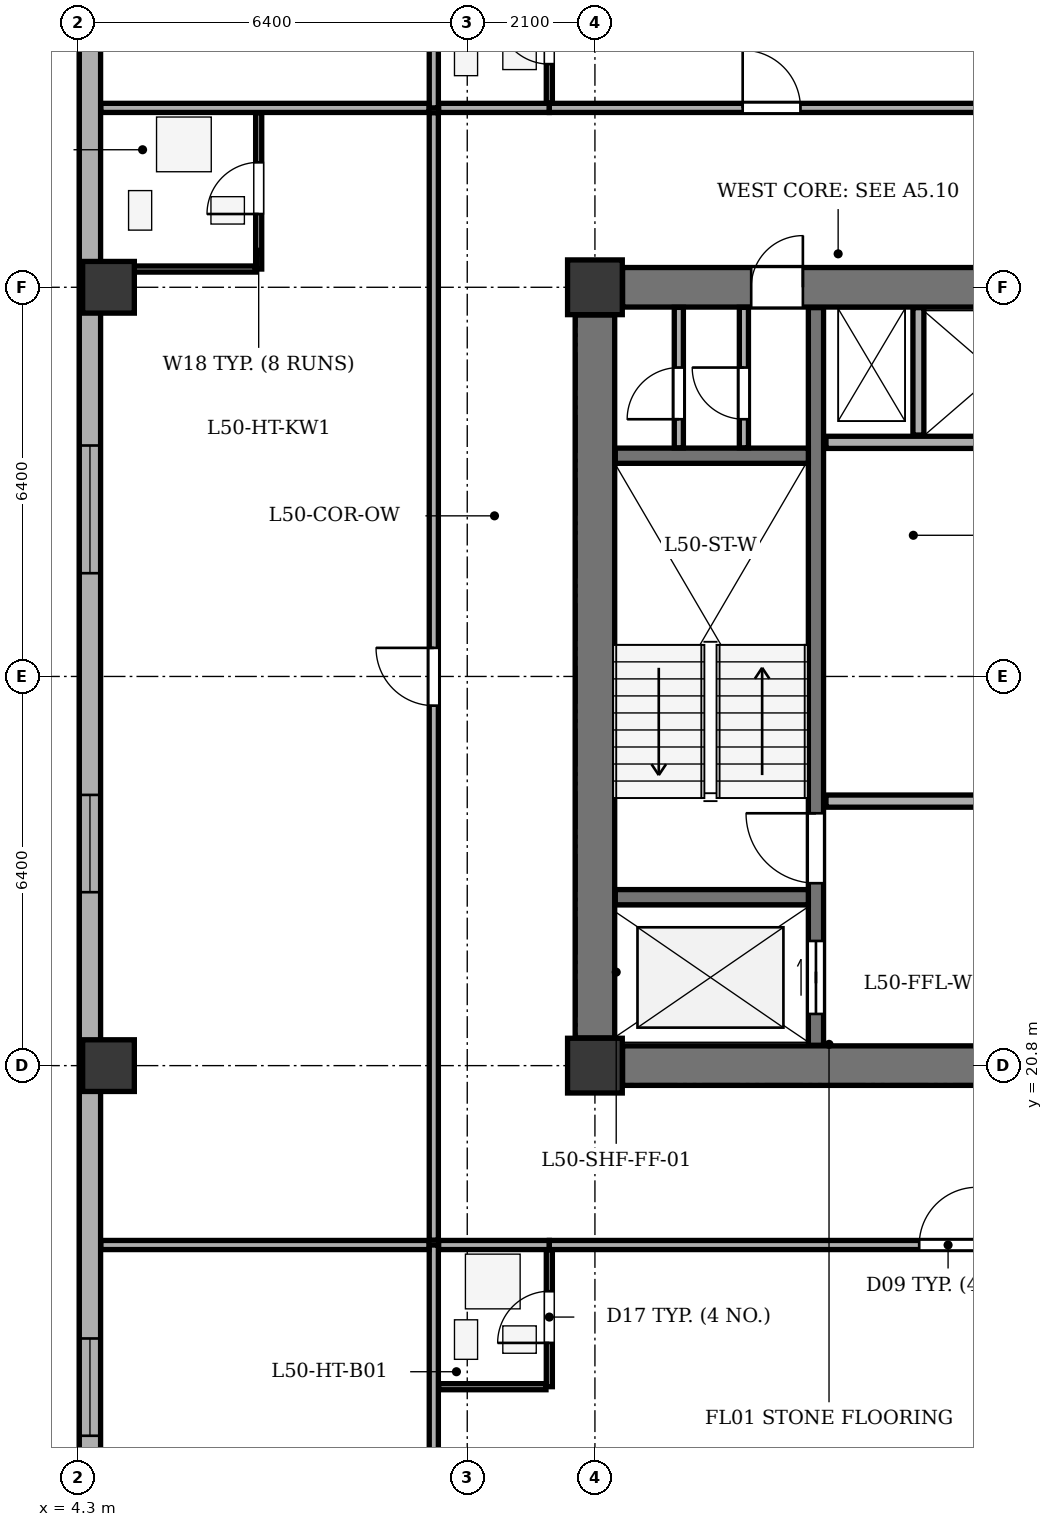
"""IFC4 building model, lengths in metres.
Left out: names, types, materials, properties, quantities, classifications, styles, units other than length and angle.
Written with IfcOpenShell. Run it as: python <this file> out.ifc"""

import sys

from ifc_helpers import new_model, si_unit, direction, frame, frame_2d, origin, origin_2d, place, context, subcontext, project, spatial, rectangle, extrude, element, fill, save


model = new_model("IFC4")
c1 = context("Model", 3, precision=1e-05, world=origin(), true_north=direction((0.0, 1.0)))
c2 = subcontext(c1, "Body", "Model", "MODEL_VIEW")
j1 = project(units=[si_unit("LENGTHUNIT", "METRE"), si_unit("PLANEANGLEUNIT", "RADIAN")], contexts=[c1])
p1 = place(None, origin())
s1 = spatial("IfcSite", under=j1, at=p1, CompositionType="ELEMENT")
p2 = place(p1, origin())
s2 = spatial("IfcBuilding", under=s1, at=p2, CompositionType="ELEMENT")
p3 = place(p2, frame((0.0, 0.0, 193.8)))
s3 = spatial("IfcBuildingStorey", under=s2, at=p3, CompositionType="ELEMENT", Elevation=193.8)
for number, where, z_axis, x_axis in (
    (1, (12.8, 20.8, 0.0), (0.0, 0.0, 1.0), (1.0, 0.0, 0.0)),
    (2, (12.8, 33.6, 0.0), (0.0, 0.0, 1.0), (1.0, 0.0, 0.0)),
):
    element("IfcColumn", number, at=place(p3, frame(where, z_axis=z_axis, x_axis=x_axis)), inside=s3, PredefinedType="COLUMN", context=c2, shape_type="SweptSolid", body=[
        extrude(rectangle(XDim=0.9, YDim=0.9, at=origin_2d()), origin(), (0.0, 0.0, 1.0), 3.5),
    ])
for number, where, z_axis, x_axis in (
    (3, (4.8, 20.8, 0.0), (0.0, 0.0, 1.0), (1.0, 0.0, 0.0)),
    (4, (4.8, 33.6, 0.0), (0.0, 0.0, 1.0), (1.0, 0.0, 0.0)),
):
    element("IfcColumn", number, at=place(p3, frame(where, z_axis=z_axis, x_axis=x_axis)), inside=s3, PredefinedType="COLUMN", context=c2, shape_type="SweptSolid", body=[
        extrude(rectangle(XDim=0.85, YDim=0.85, at=origin_2d()), origin(), (0.0, 0.0, 1.0), 3.5),
    ])
p4 = place(p3, frame((4.495, 12.9, 0.0), z_axis=(0.0, 0.0, 1.0), x_axis=(0.0, 1.0, 0.0)))
e5 = element("IfcWall", 5, at=p4, inside=s3, PredefinedType="STANDARD", context=c2, shape_type="SweptSolid", body=[
    extrude(rectangle(XDim=35.0, YDim=0.35, at=frame_2d((17.5, 0.0))), origin(), (0.0, 0.0, 1.0), 2.635),
])
p5 = place(p4, frame((1.813, 0.0, 0.75)))
e6 = element("IfcOpeningElement", 6, at=p5, cuts=e5, PredefinedType="OPENING", context=c2, shape_type="SweptSolid", body=[
    extrude(rectangle(XDim=1.6, YDim=1.75, at=frame_2d((0.8, 0.875))), frame((0.0, 0.185, 0.0), z_axis=(0.0, -1.0, 0.0), x_axis=(1.0, 0.0, 0.0)), (0.0, 0.0, 1.0), 0.37),
])
p6 = place(p4, frame((10.752, 0.0, 0.75)))
e7 = element("IfcOpeningElement", 7, at=p6, cuts=e5, PredefinedType="OPENING", context=c2, shape_type="SweptSolid", body=[
    extrude(rectangle(XDim=1.6, YDim=1.75, at=frame_2d((0.8, 0.875))), frame((0.0, 0.185, 0.0), z_axis=(0.0, -1.0, 0.0), x_axis=(1.0, 0.0, 0.0)), (0.0, 0.0, 1.0), 0.37),
])
p7 = place(p4, frame((15.998, 0.0, 0.75)))
e8 = element("IfcOpeningElement", 8, at=p7, cuts=e5, PredefinedType="OPENING", context=c2, shape_type="SweptSolid", body=[
    extrude(rectangle(XDim=2.1, YDim=1.75, at=frame_2d((1.05, 0.875))), frame((0.0, 0.185, 0.0), z_axis=(0.0, -1.0, 0.0), x_axis=(1.0, 0.0, 0.0)), (0.0, 0.0, 1.0), 0.37),
])
p8 = place(p4, frame((25.97, 0.0, 0.75)))
e9 = element("IfcOpeningElement", 9, at=p8, cuts=e5, PredefinedType="OPENING", context=c2, shape_type="SweptSolid", body=[
    extrude(rectangle(XDim=1.6, YDim=1.75, at=frame_2d((0.8, 0.875))), frame((0.0, 0.185, 0.0), z_axis=(0.0, -1.0, 0.0), x_axis=(1.0, 0.0, 0.0)), (0.0, 0.0, 1.0), 0.37),
])
p9 = place(p4, frame((30.555, 0.0, 0.75)))
e10 = element("IfcOpeningElement", 10, at=p9, cuts=e5, PredefinedType="OPENING", context=c2, shape_type="SweptSolid", body=[
    extrude(rectangle(XDim=2.1, YDim=1.75, at=frame_2d((1.05, 0.875))), frame((0.0, 0.185, 0.0), z_axis=(0.0, -1.0, 0.0), x_axis=(1.0, 0.0, 0.0)), (0.0, 0.0, 1.0), 0.37),
])
p10 = place(p3, frame((12.8, 21.255, 0.0), z_axis=(0.0, 0.0, 1.0), x_axis=(0.0, 1.0, 0.0)))
e11 = element("IfcWall", 11, at=p10, inside=s3, PredefinedType="SHEAR", context=c2, shape_type="SweptSolid", body=[
    extrude(rectangle(XDim=11.89, YDim=0.65, at=frame_2d((5.945, 0.0))), origin(), (0.0, 0.0, 1.0), 3.05),
])
p11 = place(p3, frame((13.255, 20.8, 0.0), z_axis=(0.0, 0.0, 1.0), x_axis=(1.0, 0.0, 0.0)))
e12 = element("IfcWall", 12, at=p11, inside=s3, PredefinedType="SHEAR", context=c2, shape_type="SweptSolid", body=[
    extrude(rectangle(XDim=7.09, YDim=0.65, at=frame_2d((3.545, 0.0))), origin(), (0.0, 0.0, 1.0), 3.05),
])
p12 = place(p3, frame((13.255, 33.6, 0.0), z_axis=(0.0, 0.0, 1.0), x_axis=(1.0, 0.0, 0.0)))
e13 = element("IfcWall", 13, at=p12, inside=s3, PredefinedType="SHEAR", context=c2, shape_type="SweptSolid", body=[
    extrude(rectangle(XDim=7.09, YDim=0.65, at=frame_2d((3.545, 0.0))), origin(), (0.0, 0.0, 1.0), 3.05),
])
p13 = place(p12, frame((2.115, 0.0, 0.0)))
e14 = element("IfcOpeningElement", 14, at=p13, cuts=e13, PredefinedType="OPENING", context=c2, shape_type="SweptSolid", body=[
    extrude(rectangle(XDim=0.85, YDim=2.02, at=frame_2d((0.425, 1.01))), frame((0.0, 0.335, 0.0), z_axis=(0.0, -1.0, 0.0), x_axis=(1.0, 0.0, 0.0)), (0.0, 0.0, 1.0), 0.67),
])
p14 = place(p3, frame((16.435, 21.135, 0.0), z_axis=(0.0, 0.0, 1.0), x_axis=(0.0, 1.0, 0.0)))
e15 = element("IfcWall", 15, at=p14, inside=s3, PredefinedType="SHEAR", context=c2, shape_type="SweptSolid", body=[
    extrude(rectangle(XDim=12.13, YDim=0.25, at=frame_2d((6.065, 0.0))), origin(), (0.0, 0.0, 1.0), 3.05),
])
p15 = place(p14, frame((0.515, 0.0, 0.0)))
e16 = element("IfcOpeningElement", 16, at=p15, cuts=e15, PredefinedType="OPENING", context=c2, shape_type="SweptSolid", body=[
    extrude(rectangle(XDim=1.2, YDim=2.15, at=frame_2d((0.6, 1.075))), frame((0.0, 0.135, 0.0), z_axis=(0.0, -1.0, 0.0), x_axis=(1.0, 0.0, 0.0)), (0.0, 0.0, 1.0), 0.27),
])
p16 = place(p14, frame((2.665, 0.0, 0.0)))
e17 = element("IfcOpeningElement", 17, at=p16, cuts=e15, PredefinedType="OPENING", context=c2, shape_type="SweptSolid", body=[
    extrude(rectangle(XDim=1.15, YDim=2.15, at=frame_2d((0.575, 1.075))), frame((0.0, 0.135, 0.0), z_axis=(0.0, -1.0, 0.0), x_axis=(1.0, 0.0, 0.0)), (0.0, 0.0, 1.0), 0.27),
])
for number, where, z_axis, x_axis in (
    (18, (13.135, 23.57, 0.0), (0.0, 0.0, 1.0), (1.0, 0.0, 0.0)),
    (19, (13.135, 30.83, 0.0), (0.0, 0.0, 1.0), (1.0, 0.0, 0.0)),
):
    element("IfcWall", number, at=place(p3, frame(where, z_axis=z_axis, x_axis=x_axis)), inside=s3, PredefinedType="SHEAR", context=c2, shape_type="SweptSolid", body=[
        extrude(rectangle(XDim=3.175, YDim=0.25, at=frame_2d((1.587, 0.0))), origin(), (0.0, 0.0, 1.0), 3.05),
    ])
for number, where, z_axis, x_axis in (
    (20, (16.6, 25.15, 0.0), (0.0, 0.0, 1.0), (1.0, 0.0, 0.0)),
    (21, (16.6, 31.05, 0.0), (0.0, 0.0, 1.0), (1.0, 0.0, 0.0)),
):
    element("IfcWall", number, at=place(p3, frame(where, z_axis=z_axis, x_axis=x_axis)), inside=s3, PredefinedType="SOLIDWALL", context=c2, shape_type="SweptSolid", body=[
        extrude(rectangle(XDim=3.85, YDim=0.2, at=frame_2d((1.925, 0.0))), origin(), (0.0, 0.0, 1.0), 3.05),
    ])
p17 = place(p3, frame((18.12, 31.17, 0.0), z_axis=(0.0, 0.0, 1.0), x_axis=(0.0, 1.0, 0.0)))
e22 = element("IfcWall", 22, at=p17, inside=s3, PredefinedType="PARTITIONING", context=c2, shape_type="SweptSolid", body=[
    extrude(rectangle(XDim=2.095, YDim=0.18, at=frame_2d((1.047, 0.0))), origin(), (0.0, 0.0, 1.0), 3.05),
])
p18 = place(p3, frame((14.18, 30.96, 0.0), z_axis=(0.0, 0.0, 1.0), x_axis=(0.0, 1.0, 0.0)))
e23 = element("IfcWall", 23, at=p18, inside=s3, PredefinedType="PARTITIONING", context=c2, shape_type="SweptSolid", body=[
    extrude(rectangle(XDim=2.31, YDim=0.15, at=frame_2d((1.155, 0.0))), origin(), (0.0, 0.0, 1.0), 3.05),
])
p19 = place(p18, frame((0.47, 0.0, 0.0)))
e24 = element("IfcOpeningElement", 24, at=p19, cuts=e23, PredefinedType="OPENING", context=c2, shape_type="SweptSolid", body=[
    extrude(rectangle(XDim=0.85, YDim=2.02, at=frame_2d((0.425, 1.01))), frame((0.0, 0.085, 0.0), z_axis=(0.0, -1.0, 0.0), x_axis=(1.0, 0.0, 0.0)), (0.0, 0.0, 1.0), 0.17),
])
p20 = place(p3, frame((15.25, 30.96, 0.0), z_axis=(0.0, 0.0, 1.0), x_axis=(0.0, 1.0, 0.0)))
e25 = element("IfcWall", 25, at=p20, inside=s3, PredefinedType="PARTITIONING", context=c2, shape_type="SweptSolid", body=[
    extrude(rectangle(XDim=2.31, YDim=0.15, at=frame_2d((1.155, 0.0))), origin(), (0.0, 0.0, 1.0), 3.05),
])
p21 = place(p20, frame((0.47, 0.0, 0.0)))
e26 = element("IfcOpeningElement", 26, at=p21, cuts=e25, PredefinedType="OPENING", context=c2, shape_type="SweptSolid", body=[
    extrude(rectangle(XDim=0.85, YDim=2.02, at=frame_2d((0.425, 1.01))), frame((0.0, 0.085, 0.0), z_axis=(0.0, -1.0, 0.0), x_axis=(1.0, 0.0, 0.0)), (0.0, 0.0, 1.0), 0.17),
])
p22 = place(p3, frame((10.15, 8.275, 0.0), z_axis=(0.0, 0.0, 1.0), x_axis=(0.0, 1.0, 0.0)))
e27 = element("IfcWall", 27, at=p22, inside=s3, PredefinedType="PARTITIONING", context=c2, shape_type="SweptSolid", body=[
    extrude(rectangle(XDim=9.575, YDim=0.15, at=frame_2d((4.788, 0.0))), origin(), (0.0, 0.0, 1.0), 3.05),
])
p23 = place(p3, frame((10.23, 17.85, 0.0), z_axis=(0.0, 0.0, 1.0), x_axis=(1.0, 0.0, 0.0)))
e28 = element("IfcWall", 28, at=p23, inside=s3, PredefinedType="PARTITIONING", context=c2, shape_type="SweptSolid", body=[
    extrude(rectangle(XDim=1.82, YDim=0.15, at=frame_2d((0.91, 0.0))), origin(), (0.0, 0.0, 1.0), 3.05),
])
p24 = place(p3, frame((12.05, 17.85, 0.0), z_axis=(0.0, 0.0, 1.0), x_axis=(1.0, 0.0, 0.0)))
e29 = element("IfcWall", 29, at=p24, inside=s3, PredefinedType="PARTITIONING", context=c2, shape_type="SweptSolid", body=[
    extrude(rectangle(XDim=13.126, YDim=0.15, at=frame_2d((6.563, 0.0))), origin(), (0.0, 0.0, 1.0), 3.05),
])
p25 = place(p24, frame((6.083, 0.0, 0.0)))
e30 = element("IfcOpeningElement", 30, at=p25, cuts=e29, PredefinedType="OPENING", context=c2, shape_type="SweptSolid", body=[
    extrude(rectangle(XDim=0.95, YDim=2.1, at=frame_2d((0.475, 1.05))), frame((0.0, 0.085, 0.0), z_axis=(0.0, -1.0, 0.0), x_axis=(1.0, 0.0, 0.0)), (0.0, 0.0, 1.0), 0.17),
])
p26 = place(p3, frame((12.05, 15.52, 0.0), z_axis=(0.0, 0.0, 1.0), x_axis=(0.0, 1.0, 0.0)))
e31 = element("IfcWall", 31, at=p26, inside=s3, PredefinedType="PARTITIONING", context=c2, shape_type="SweptSolid", body=[
    extrude(rectangle(XDim=2.25, YDim=0.1, at=frame_2d((1.125, 0.0))), origin(), (0.0, 0.0, 1.0), 3.05),
])
p27 = place(p26, frame((0.72, 0.0, 0.0)))
e32 = element("IfcOpeningElement", 32, at=p27, cuts=e31, PredefinedType="OPENING", context=c2, shape_type="SweptSolid", body=[
    extrude(rectangle(XDim=0.85, YDim=2.05, at=frame_2d((0.425, 1.025))), frame((0.0, 0.06, 0.0), z_axis=(0.0, -1.0, 0.0), x_axis=(1.0, 0.0, 0.0)), (0.0, 0.0, 1.0), 0.12),
])
p28 = place(p3, frame((10.23, 15.52, 0.0), z_axis=(0.0, 0.0, 1.0), x_axis=(1.0, 0.0, 0.0)))
e33 = element("IfcWall", 33, at=p28, inside=s3, PredefinedType="PARTITIONING", context=c2, shape_type="SweptSolid", body=[
    extrude(rectangle(XDim=1.765, YDim=0.1, at=frame_2d((0.883, 0.0))), origin(), (0.0, 0.0, 1.0), 3.05),
])
p29 = place(p3, frame((10.15, 36.55, 0.0), z_axis=(0.0, 0.0, 1.0), x_axis=(0.0, 1.0, 0.0)))
e34 = element("IfcWall", 34, at=p29, inside=s3, PredefinedType="PARTITIONING", context=c2, shape_type="SweptSolid", body=[
    extrude(rectangle(XDim=15.975, YDim=0.15, at=frame_2d((7.987, 0.0))), origin(), (0.0, 0.0, 1.0), 3.05),
])
p30 = place(p3, frame((10.23, 36.55, 0.0), z_axis=(0.0, 0.0, 1.0), x_axis=(1.0, 0.0, 0.0)))
e35 = element("IfcWall", 35, at=p30, inside=s3, PredefinedType="PARTITIONING", context=c2, shape_type="SweptSolid", body=[
    extrude(rectangle(XDim=1.82, YDim=0.15, at=frame_2d((0.91, 0.0))), origin(), (0.0, 0.0, 1.0), 3.05),
])
p31 = place(p3, frame((12.05, 36.55, 0.0), z_axis=(0.0, 0.0, 1.0), x_axis=(1.0, 0.0, 0.0)))
e36 = element("IfcWall", 36, at=p31, inside=s3, PredefinedType="PARTITIONING", context=c2, shape_type="SweptSolid", body=[
    extrude(rectangle(XDim=7.24, YDim=0.15, at=frame_2d((3.62, 0.0))), origin(), (0.0, 0.0, 1.0), 3.05),
])
p32 = place(p31, frame((3.18, 0.0, 0.0)))
e37 = element("IfcOpeningElement", 37, at=p32, cuts=e36, PredefinedType="OPENING", context=c2, shape_type="SweptSolid", body=[
    extrude(rectangle(XDim=0.95, YDim=2.1, at=frame_2d((0.475, 1.05))), frame((0.0, 0.085, 0.0), z_axis=(0.0, -1.0, 0.0), x_axis=(1.0, 0.0, 0.0)), (0.0, 0.0, 1.0), 0.17),
])
p33 = place(p3, frame((12.05, 36.63, 0.0), z_axis=(0.0, 0.0, 1.0), x_axis=(0.0, 1.0, 0.0)))
e38 = element("IfcWall", 38, at=p33, inside=s3, PredefinedType="PARTITIONING", context=c2, shape_type="SweptSolid", body=[
    extrude(rectangle(XDim=2.25, YDim=0.1, at=frame_2d((1.125, 0.0))), origin(), (0.0, 0.0, 1.0), 3.05),
])
p34 = place(p33, frame((0.64, 0.0, 0.0)))
e39 = element("IfcOpeningElement", 39, at=p34, cuts=e38, PredefinedType="OPENING", context=c2, shape_type="SweptSolid", body=[
    extrude(rectangle(XDim=0.85, YDim=2.05, at=frame_2d((0.425, 1.025))), frame((0.0, 0.06, 0.0), z_axis=(0.0, -1.0, 0.0), x_axis=(1.0, 0.0, 0.0)), (0.0, 0.0, 1.0), 0.12),
])
for number, where, z_axis, x_axis in (
    (40, (4.675, 17.85, 0.0), (0.0, 0.0, 1.0), (1.0, 0.0, 0.0)),
    (41, (4.675, 36.55, 0.0), (0.0, 0.0, 1.0), (1.0, 0.0, 0.0)),
):
    element("IfcWall", number, at=place(p3, frame(where, z_axis=z_axis, x_axis=x_axis)), inside=s3, PredefinedType="PARTITIONING", context=c2, shape_type="SweptSolid", body=[
        extrude(rectangle(XDim=5.395, YDim=0.15, at=frame_2d((2.698, 0.0))), origin(), (0.0, 0.0, 1.0), 3.05),
    ])
p35 = place(p3, frame((10.15, 17.93, 0.0), z_axis=(0.0, 0.0, 1.0), x_axis=(0.0, 1.0, 0.0)))
e42 = element("IfcWall", 42, at=p35, inside=s3, PredefinedType="PARTITIONING", context=c2, shape_type="SweptSolid", body=[
    extrude(rectangle(XDim=18.54, YDim=0.15, at=frame_2d((9.27, 0.0))), origin(), (0.0, 0.0, 1.0), 3.05),
])
p36 = place(p35, frame((8.79, 0.0, 0.0)))
e43 = element("IfcOpeningElement", 43, at=p36, cuts=e42, PredefinedType="OPENING", context=c2, shape_type="SweptSolid", body=[
    extrude(rectangle(XDim=0.95, YDim=2.1, at=frame_2d((0.475, 1.05))), frame((0.0, 0.085, 0.0), z_axis=(0.0, -1.0, 0.0), x_axis=(1.0, 0.0, 0.0)), (0.0, 0.0, 1.0), 0.17),
])
p37 = place(p3, frame((7.27, 33.9, 0.0), z_axis=(0.0, 0.0, 1.0), x_axis=(0.0, 1.0, 0.0)))
e44 = element("IfcWall", 44, at=p37, inside=s3, PredefinedType="PARTITIONING", context=c2, shape_type="SweptSolid", body=[
    extrude(rectangle(XDim=2.57, YDim=0.1, at=frame_2d((1.285, 0.0))), origin(), (0.0, 0.0, 1.0), 3.05),
])
p38 = place(p37, frame((0.905, 0.0, 0.0)))
e45 = element("IfcOpeningElement", 45, at=p38, cuts=e44, PredefinedType="OPENING", context=c2, shape_type="SweptSolid", body=[
    extrude(rectangle(XDim=0.85, YDim=2.05, at=frame_2d((0.425, 1.025))), frame((0.0, 0.06, 0.0), z_axis=(0.0, -1.0, 0.0), x_axis=(1.0, 0.0, 0.0)), (0.0, 0.0, 1.0), 0.12),
])
p39 = place(p3, frame((4.675, 33.9, 0.0), z_axis=(0.0, 0.0, 1.0), x_axis=(1.0, 0.0, 0.0)))
e46 = element("IfcWall", 46, at=p39, inside=s3, PredefinedType="PARTITIONING", context=c2, shape_type="SweptSolid", body=[
    extrude(rectangle(XDim=2.54, YDim=0.1, at=frame_2d((1.27, 0.0))), origin(), (0.0, 0.0, 1.0), 2.385),
])
p40 = place(p5, origin())
e47 = element("IfcWindow", 47, at=p40, inside=s3, PartitioningType="SINGLE_PANEL", PredefinedType="WINDOW", context=c2, shape_type="SweptSolid", body=[
    extrude(rectangle(XDim=1.6, YDim=1.75, at=frame_2d((0.8, 0.875))), frame((0.0, -0.01, 0.0), z_axis=(0.0, -1.0, 0.0), x_axis=(1.0, 0.0, 0.0)), (0.0, 0.0, 1.0), 0.06),
])
fill(e6, e47)
p41 = place(p6, origin())
e48 = element("IfcWindow", 48, at=p41, inside=s3, PartitioningType="SINGLE_PANEL", PredefinedType="WINDOW", context=c2, shape_type="SweptSolid", body=[
    extrude(rectangle(XDim=1.6, YDim=1.75, at=frame_2d((0.8, 0.875))), frame((0.0, -0.01, 0.0), z_axis=(0.0, -1.0, 0.0), x_axis=(1.0, 0.0, 0.0)), (0.0, 0.0, 1.0), 0.06),
])
fill(e7, e48)
p42 = place(p7, origin())
e49 = element("IfcWindow", 49, at=p42, inside=s3, PartitioningType="SINGLE_PANEL", PredefinedType="WINDOW", context=c2, shape_type="SweptSolid", body=[
    extrude(rectangle(XDim=2.1, YDim=1.75, at=frame_2d((1.05, 0.875))), frame((0.0, -0.01, 0.0), z_axis=(0.0, -1.0, 0.0), x_axis=(1.0, 0.0, 0.0)), (0.0, 0.0, 1.0), 0.06),
])
fill(e8, e49)
p43 = place(p13, origin())
e50 = element("IfcDoor", 50, at=p43, inside=s3, OperationType="SINGLE_SWING_RIGHT", PredefinedType="DOOR", context=c2, shape_type="SweptSolid", body=[
    extrude(rectangle(XDim=0.85, YDim=2.02, at=frame_2d((0.425, 1.01))), frame((0.0, 0.025, 0.0), z_axis=(0.0, -1.0, 0.0), x_axis=(1.0, 0.0, 0.0)), (0.0, 0.0, 1.0), 0.05),
])
fill(e14, e50)
p44 = place(p15, origin())
e51 = element("IfcDoor", 51, at=p44, inside=s3, OperationType="DOUBLE_DOOR_SLIDING", PredefinedType="DOOR", context=c2, shape_type="SweptSolid", body=[
    extrude(rectangle(XDim=1.2, YDim=2.15, at=frame_2d((0.6, 1.075))), frame((0.0, 0.025, 0.0), z_axis=(0.0, -1.0, 0.0), x_axis=(1.0, 0.0, 0.0)), (0.0, 0.0, 1.0), 0.05),
])
fill(e16, e51)
p45 = place(p16, origin())
e52 = element("IfcDoor", 52, at=p45, inside=s3, OperationType="SINGLE_SWING_RIGHT", PredefinedType="DOOR", context=c2, shape_type="SweptSolid", body=[
    extrude(rectangle(XDim=1.15, YDim=2.15, at=frame_2d((0.575, 1.075))), frame((0.0, 0.025, 0.0), z_axis=(0.0, -1.0, 0.0), x_axis=(1.0, 0.0, 0.0)), (0.0, 0.0, 1.0), 0.05),
])
fill(e17, e52)
p46 = place(p19, origin())
e53 = element("IfcDoor", 53, at=p46, inside=s3, OperationType="SINGLE_SWING_LEFT", PredefinedType="DOOR", context=c2, shape_type="SweptSolid", body=[
    extrude(rectangle(XDim=0.85, YDim=2.02, at=frame_2d((0.425, 1.01))), frame((0.0, 0.025, 0.0), z_axis=(0.0, -1.0, 0.0), x_axis=(1.0, 0.0, 0.0)), (0.0, 0.0, 1.0), 0.05),
])
fill(e24, e53)
p47 = place(p21, origin())
e54 = element("IfcDoor", 54, at=p47, inside=s3, OperationType="SINGLE_SWING_RIGHT", PredefinedType="DOOR", context=c2, shape_type="SweptSolid", body=[
    extrude(rectangle(XDim=0.85, YDim=2.02, at=frame_2d((0.425, 1.01))), frame((0.0, 0.025, 0.0), z_axis=(0.0, -1.0, 0.0), x_axis=(1.0, 0.0, 0.0)), (0.0, 0.0, 1.0), 0.05),
])
fill(e26, e54)
p48 = place(p27, origin())
e55 = element("IfcDoor", 55, at=p48, inside=s3, OperationType="SINGLE_SWING_LEFT", PredefinedType="DOOR", context=c2, shape_type="SweptSolid", body=[
    extrude(rectangle(XDim=0.85, YDim=2.05, at=frame_2d((0.425, 1.025))), frame((0.0, 0.025, 0.0), z_axis=(0.0, -1.0, 0.0), x_axis=(1.0, 0.0, 0.0)), (0.0, 0.0, 1.0), 0.05),
])
fill(e32, e55)
p49 = place(p25, origin())
e56 = element("IfcDoor", 56, at=p49, inside=s3, OperationType="SINGLE_SWING_RIGHT", PredefinedType="DOOR", context=c2, shape_type="SweptSolid", body=[
    extrude(rectangle(XDim=0.95, YDim=2.1, at=frame_2d((0.475, 1.05))), frame((0.0, 0.025, 0.0), z_axis=(0.0, -1.0, 0.0), x_axis=(1.0, 0.0, 0.0)), (0.0, 0.0, 1.0), 0.05),
])
fill(e30, e56)
p50 = place(p34, origin())
e57 = element("IfcDoor", 57, at=p50, inside=s3, OperationType="SINGLE_SWING_RIGHT", PredefinedType="DOOR", context=c2, shape_type="SweptSolid", body=[
    extrude(rectangle(XDim=0.85, YDim=2.05, at=frame_2d((0.425, 1.025))), frame((0.0, 0.025, 0.0), z_axis=(0.0, -1.0, 0.0), x_axis=(1.0, 0.0, 0.0)), (0.0, 0.0, 1.0), 0.05),
])
fill(e39, e57)
p51 = place(p32, origin())
e58 = element("IfcDoor", 58, at=p51, inside=s3, OperationType="SINGLE_SWING_LEFT", PredefinedType="DOOR", context=c2, shape_type="SweptSolid", body=[
    extrude(rectangle(XDim=0.95, YDim=2.1, at=frame_2d((0.475, 1.05))), frame((0.0, 0.025, 0.0), z_axis=(0.0, -1.0, 0.0), x_axis=(1.0, 0.0, 0.0)), (0.0, 0.0, 1.0), 0.05),
])
fill(e37, e58)
p52 = place(p38, origin())
e59 = element("IfcDoor", 59, at=p52, inside=s3, OperationType="SINGLE_SWING_LEFT", PredefinedType="DOOR", context=c2, shape_type="SweptSolid", body=[
    extrude(rectangle(XDim=0.85, YDim=2.05, at=frame_2d((0.425, 1.025))), frame((0.0, 0.025, 0.0), z_axis=(0.0, -1.0, 0.0), x_axis=(1.0, 0.0, 0.0)), (0.0, 0.0, 1.0), 0.05),
])
fill(e45, e59)
p53 = place(p36, origin())
e60 = element("IfcDoor", 60, at=p53, inside=s3, OperationType="SINGLE_SWING_RIGHT", PredefinedType="DOOR", context=c2, shape_type="SweptSolid", body=[
    extrude(rectangle(XDim=0.95, YDim=2.1, at=frame_2d((0.475, 1.05))), frame((0.0, 0.025, 0.0), z_axis=(0.0, -1.0, 0.0), x_axis=(1.0, 0.0, 0.0)), (0.0, 0.0, 1.0), 0.05),
])
fill(e43, e60)
save(model, sys.argv[1])
